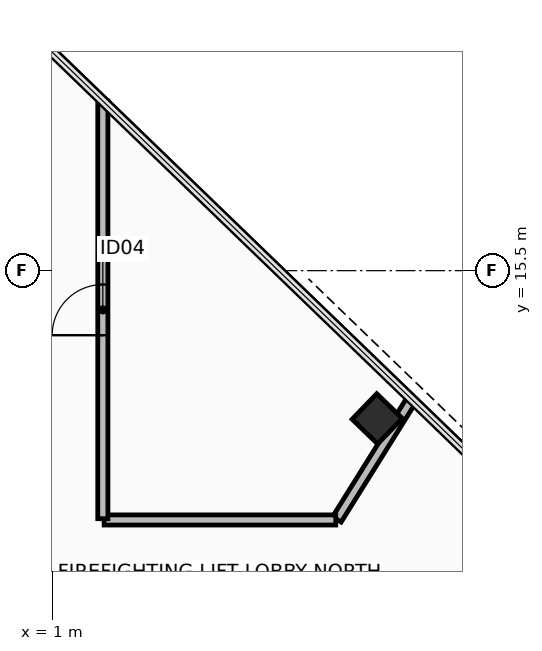
"""IFC4 building model, lengths in metres.
Left out: names, types, materials, properties, quantities, classifications, styles, units other than length and angle.
Written with IfcOpenShell. Run it as: python <this file> out.ifc"""

import sys

from ifc_helpers import new_model, si_unit, direction, frame, frame_2d, origin, origin_2d, place, context, subcontext, project, spatial, rectangle, hollow_rectangle, extrude, element, fill, save


model = new_model("IFC4")
c1 = context("Model", 3, precision=1e-05, world=origin(), true_north=direction((0.0, 1.0)))
c2 = subcontext(c1, "Body", "Model", "MODEL_VIEW")
j1 = project(units=[si_unit("LENGTHUNIT", "METRE"), si_unit("PLANEANGLEUNIT", "RADIAN")], contexts=[c1])
p1 = place(None, origin())
s1 = spatial("IfcSite", under=j1, at=p1, CompositionType="ELEMENT")
p2 = place(p1, origin())
s2 = spatial("IfcBuilding", under=s1, at=p2, CompositionType="ELEMENT")
p3 = place(p2, frame((0.0, 0.0, 86.1)))
s3 = spatial("IfcBuildingStorey", under=s2, at=p3, CompositionType="ELEMENT", Elevation=86.1)
p4 = place(p3, frame((7.415, 12.576, 0.0), z_axis=(0.0, 0.0, 1.0), x_axis=(-0.719339800339, 0.694658370459, 0.0)))
e1 = element("IfcColumn", 1, at=p4, inside=s3, PredefinedType="COLUMN", context=c2, shape_type="SweptSolid", body=[
    extrude(hollow_rectangle(XDim=0.7, YDim=0.7, WallThickness=0.04, at=origin_2d()), origin(), (0.0, 0.0, 1.0), 3.6),
])
p5 = place(p3, frame((8.087, 12.942, 0.0), z_axis=(0.0, 0.0, 1.0), x_axis=(-0.529919746943, -0.848047794526, 0.0)))
e2 = element("IfcWall", 2, at=p5, inside=s3, PredefinedType="PARTITIONING", context=c2, shape_type="SweptSolid", body=[
    extrude(rectangle(XDim=2.771, YDim=0.2, at=frame_2d((1.386, 0.0))), origin(), (0.0, 0.0, 1.0), 2.605),
])
p6 = place(p3, frame((6.597, 10.58, 0.0), z_axis=(0.0, 0.0, 1.0), x_axis=(-1.0, 0.0, 0.0)))
e3 = element("IfcWall", 3, at=p6, inside=s3, PredefinedType="PARTITIONING", context=c2, shape_type="SweptSolid", body=[
    extrude(rectangle(XDim=4.573, YDim=0.2, at=frame_2d((2.286, 0.0))), origin(), (0.0, 0.0, 1.0), 3.005),
])
p7 = place(p3, frame((2.0, 10.605, 0.0), z_axis=(0.0, 0.0, 1.0), x_axis=(0.0, 1.0, 0.0)))
e4 = element("IfcWall", 4, at=p7, inside=s3, PredefinedType="PARTITIONING", context=c2, shape_type="SweptSolid", body=[
    extrude(rectangle(XDim=8.242, YDim=0.2, at=frame_2d((4.121, 0.0))), origin(), (0.0, 0.0, 1.0), 2.605),
])
p8 = place(p7, frame((3.621, 0.0, 0.0)))
e5 = element("IfcOpeningElement", 5, at=p8, cuts=e4, PredefinedType="OPENING", context=c2, shape_type="SweptSolid", body=[
    extrude(rectangle(XDim=1.0, YDim=2.15, at=frame_2d((0.5, 1.075))), frame((0.0, 0.11, 0.0), z_axis=(0.0, -1.0, 0.0), x_axis=(1.0, 0.0, 0.0)), (0.0, 0.0, 1.0), 0.22),
])
p9 = place(p8, origin())
e6 = element("IfcDoor", 6, at=p9, inside=s3, OperationType="SINGLE_SWING_RIGHT", PredefinedType="DOOR", context=c2, shape_type="SweptSolid", body=[
    extrude(rectangle(XDim=1.0, YDim=2.15, at=frame_2d((0.5, 1.075))), frame((0.0, 0.025, 0.0), z_axis=(0.0, -1.0, 0.0), x_axis=(1.0, 0.0, 0.0)), (0.0, 0.0, 1.0), 0.05),
])
fill(e5, e6)
save(model, sys.argv[1])
